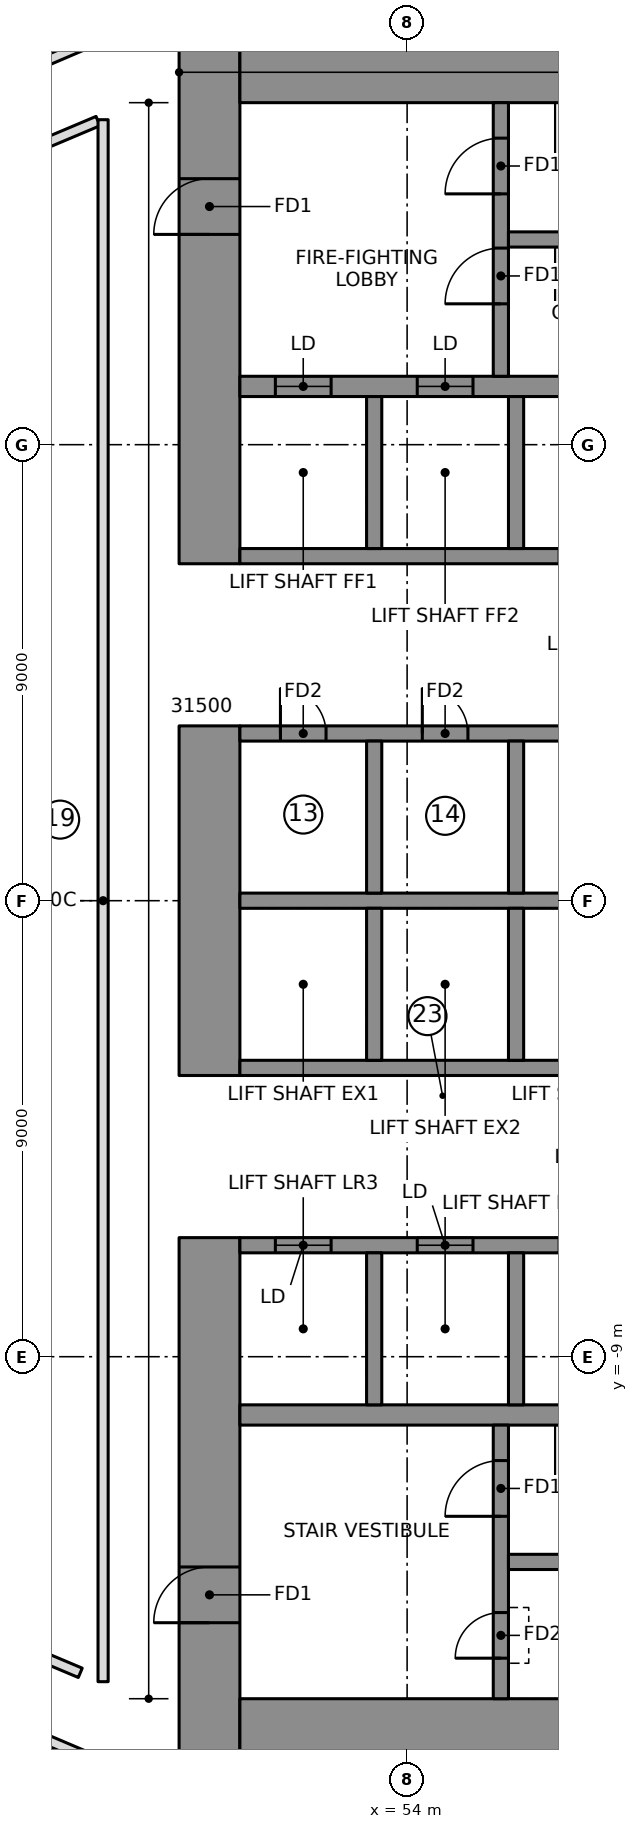
"""IFC4 building model, lengths in metres.
Left out: names, types, materials, properties, quantities, classifications, styles, units other than length and angle.
Written with IfcOpenShell. Run it as: python <this file> out.ifc"""

import sys

from ifc_helpers import new_model, si_unit, direction, frame, frame_2d, origin, place, context, subcontext, project, spatial, rectangle, extrude, element, fill, save


model = new_model("IFC4")
c1 = context("Model", 3, precision=1e-05, world=origin(), true_north=direction((0.0, 1.0)))
c2 = subcontext(c1, "Body", "Model", "MODEL_VIEW")
j1 = project(units=[si_unit("LENGTHUNIT", "METRE"), si_unit("PLANEANGLEUNIT", "RADIAN")], contexts=[c1])
p1 = place(None, origin())
s1 = spatial("IfcSite", under=j1, at=p1, CompositionType="ELEMENT")
p2 = place(p1, origin())
s2 = spatial("IfcBuilding", under=s1, at=p2, CompositionType="ELEMENT")
p3 = place(p2, frame((0.0, 0.0, 50.25)))
s3 = spatial("IfcBuildingStorey", under=s2, at=p3, CompositionType="ELEMENT", Elevation=50.25)
p4 = place(p3, frame((50.1, 6.65, 0.0), z_axis=(0.0, 0.0, 1.0), x_axis=(0.0, 1.0, 0.0)))
e1 = element("IfcWall", 1, at=p4, inside=s3, PredefinedType="SHEAR", context=c2, shape_type="SweptSolid", body=[
    extrude(rectangle(XDim=10.3, YDim=1.2, at=frame_2d((5.15, 0.0))), origin(), (0.0, 0.0, 1.0), 3.55),
])
p5 = place(p4, frame((6.5, 0.0, 0.0)))
e2 = element("IfcOpeningElement", 2, at=p5, cuts=e1, PredefinedType="OPENING", context=c2, shape_type="SweptSolid", body=[
    extrude(rectangle(XDim=1.1, YDim=2.1, at=frame_2d((0.55, 1.05))), frame((0.0, 0.61, 0.0), z_axis=(0.0, -1.0, 0.0), x_axis=(1.0, 0.0, 0.0)), (0.0, 0.0, 1.0), 1.22),
])
p6 = place(p3, frame((50.1, -3.45, 0.0), z_axis=(0.0, 0.0, 1.0), x_axis=(0.0, 1.0, 0.0)))
e3 = element("IfcWall", 3, at=p6, inside=s3, PredefinedType="SHEAR", context=c2, shape_type="SweptSolid", body=[
    extrude(rectangle(XDim=6.9, YDim=1.2, at=frame_2d((3.45, 0.0))), origin(), (0.0, 0.0, 1.0), 3.55),
])
p7 = place(p3, frame((50.1, -16.95, 0.0), z_axis=(0.0, 0.0, 1.0), x_axis=(0.0, 1.0, 0.0)))
e4 = element("IfcWall", 4, at=p7, inside=s3, PredefinedType="SHEAR", context=c2, shape_type="SweptSolid", body=[
    extrude(rectangle(XDim=10.3, YDim=1.2, at=frame_2d((5.15, 0.0))), origin(), (0.0, 0.0, 1.0), 3.55),
])
p8 = place(p7, frame((2.7, 0.0, 0.0)))
e5 = element("IfcOpeningElement", 5, at=p8, cuts=e4, PredefinedType="OPENING", context=c2, shape_type="SweptSolid", body=[
    extrude(rectangle(XDim=1.1, YDim=2.1, at=frame_2d((0.55, 1.05))), frame((0.0, 0.61, 0.0), z_axis=(0.0, -1.0, 0.0), x_axis=(1.0, 0.0, 0.0)), (0.0, 0.0, 1.0), 1.22),
])
for number, where, z_axis, x_axis in (
    (6, (50.7, 16.35, 0.0), (0.0, 0.0, 1.0), (1.0, 0.0, 0.0)),
    (7, (50.7, -16.35, 0.0), (0.0, 0.0, 1.0), (1.0, 0.0, 0.0)),
):
    element("IfcWall", number, at=place(p3, frame(where, z_axis=z_axis, x_axis=x_axis)), inside=s3, PredefinedType="SHEAR", context=c2, shape_type="SweptSolid", body=[
        extrude(rectangle(XDim=14.22, YDim=1.2, at=frame_2d((7.11, 0.0))), origin(), (0.0, 0.0, 1.0), 3.55),
    ])
p9 = place(p3, frame((50.7, 10.15, 0.0), z_axis=(0.0, 0.0, 1.0), x_axis=(1.0, 0.0, 0.0)))
e8 = element("IfcWall", 8, at=p9, inside=s3, PredefinedType="SHEAR", context=c2, shape_type="SweptSolid", body=[
    extrude(rectangle(XDim=13.02, YDim=0.4, at=frame_2d((6.51, 0.0))), origin(), (0.0, 0.0, 1.0), 3.55),
])
p10 = place(p9, frame((0.7, 0.0, 0.0)))
e9 = element("IfcOpeningElement", 9, at=p10, cuts=e8, PredefinedType="OPENING", context=c2, shape_type="SweptSolid", body=[
    extrude(rectangle(XDim=1.1, YDim=2.1, at=frame_2d((0.55, 1.05))), frame((0.0, 0.21, 0.0), z_axis=(0.0, -1.0, 0.0), x_axis=(1.0, 0.0, 0.0)), (0.0, 0.0, 1.0), 0.42),
])
p11 = place(p9, frame((3.5, 0.0, 0.0)))
e10 = element("IfcOpeningElement", 10, at=p11, cuts=e8, PredefinedType="OPENING", context=c2, shape_type="SweptSolid", body=[
    extrude(rectangle(XDim=1.1, YDim=2.1, at=frame_2d((0.55, 1.05))), frame((0.0, 0.21, 0.0), z_axis=(0.0, -1.0, 0.0), x_axis=(1.0, 0.0, 0.0)), (0.0, 0.0, 1.0), 0.42),
])
p12 = place(p3, frame((50.7, -10.15, 0.0), z_axis=(0.0, 0.0, 1.0), x_axis=(1.0, 0.0, 0.0)))
e11 = element("IfcWall", 11, at=p12, inside=s3, PredefinedType="SHEAR", context=c2, shape_type="SweptSolid", body=[
    extrude(rectangle(XDim=13.02, YDim=0.4, at=frame_2d((6.51, 0.0))), origin(), (0.0, 0.0, 1.0), 3.55),
])
p13 = place(p3, frame((50.7, 0.0, 0.0), z_axis=(0.0, 0.0, 1.0), x_axis=(1.0, 0.0, 0.0)))
e12 = element("IfcWall", 12, at=p13, inside=s3, PredefinedType="SHEAR", context=c2, shape_type="SweptSolid", body=[
    extrude(rectangle(XDim=10.9, YDim=0.3, at=frame_2d((5.45, 0.0))), origin(), (0.0, 0.0, 1.0), 3.55),
])
p14 = place(p3, frame((50.7, 3.3, 0.0), z_axis=(0.0, 0.0, 1.0), x_axis=(1.0, 0.0, 0.0)))
e13 = element("IfcWall", 13, at=p14, inside=s3, PredefinedType="SHEAR", context=c2, shape_type="SweptSolid", body=[
    extrude(rectangle(XDim=10.9, YDim=0.3, at=frame_2d((5.45, 0.0))), origin(), (0.0, 0.0, 1.0), 3.55),
])
p15 = place(p14, frame((0.8, 0.0, 0.0)))
e14 = element("IfcOpeningElement", 14, at=p15, cuts=e13, PredefinedType="OPENING", context=c2, shape_type="SweptSolid", body=[
    extrude(rectangle(XDim=0.9, YDim=2.1, at=frame_2d((0.45, 1.05))), frame((0.0, 0.16, 0.0), z_axis=(0.0, -1.0, 0.0), x_axis=(1.0, 0.0, 0.0)), (0.0, 0.0, 1.0), 0.32),
])
p16 = place(p14, frame((3.6, 0.0, 0.0)))
e15 = element("IfcOpeningElement", 15, at=p16, cuts=e13, PredefinedType="OPENING", context=c2, shape_type="SweptSolid", body=[
    extrude(rectangle(XDim=0.9, YDim=2.1, at=frame_2d((0.45, 1.05))), frame((0.0, 0.16, 0.0), z_axis=(0.0, -1.0, 0.0), x_axis=(1.0, 0.0, 0.0)), (0.0, 0.0, 1.0), 0.32),
])
p17 = place(p14, frame((6.4, 0.0, 0.0)))
e16 = element("IfcOpeningElement", 16, at=p17, cuts=e13, PredefinedType="OPENING", context=c2, shape_type="SweptSolid", body=[
    extrude(rectangle(XDim=0.9, YDim=2.1, at=frame_2d((0.45, 1.05))), frame((0.0, 0.16, 0.0), z_axis=(0.0, -1.0, 0.0), x_axis=(1.0, 0.0, 0.0)), (0.0, 0.0, 1.0), 0.32),
])
p18 = place(p14, frame((9.2, 0.0, 0.0)))
e17 = element("IfcOpeningElement", 17, at=p18, cuts=e13, PredefinedType="OPENING", context=c2, shape_type="SweptSolid", body=[
    extrude(rectangle(XDim=0.9, YDim=2.1, at=frame_2d((0.45, 1.05))), frame((0.0, 0.16, 0.0), z_axis=(0.0, -1.0, 0.0), x_axis=(1.0, 0.0, 0.0)), (0.0, 0.0, 1.0), 0.32),
])
p19 = place(p3, frame((50.7, 6.8, 0.0), z_axis=(0.0, 0.0, 1.0), x_axis=(1.0, 0.0, 0.0)))
e18 = element("IfcWall", 18, at=p19, inside=s3, PredefinedType="SHEAR", context=c2, shape_type="SweptSolid", body=[
    extrude(rectangle(XDim=10.9, YDim=0.3, at=frame_2d((5.45, 0.0))), origin(), (0.0, 0.0, 1.0), 3.55),
])
p20 = place(p19, frame((6.3, 0.0, 0.0)))
e19 = element("IfcOpeningElement", 19, at=p20, cuts=e18, PredefinedType="OPENING", context=c2, shape_type="SweptSolid", body=[
    extrude(rectangle(XDim=1.1, YDim=2.1, at=frame_2d((0.55, 1.05))), frame((0.0, 0.16, 0.0), z_axis=(0.0, -1.0, 0.0), x_axis=(1.0, 0.0, 0.0)), (0.0, 0.0, 1.0), 0.32),
])
p21 = place(p19, frame((9.1, 0.0, 0.0)))
e20 = element("IfcOpeningElement", 20, at=p21, cuts=e18, PredefinedType="OPENING", context=c2, shape_type="SweptSolid", body=[
    extrude(rectangle(XDim=1.1, YDim=2.1, at=frame_2d((0.55, 1.05))), frame((0.0, 0.16, 0.0), z_axis=(0.0, -1.0, 0.0), x_axis=(1.0, 0.0, 0.0)), (0.0, 0.0, 1.0), 0.32),
])
for number, where, z_axis, x_axis in (
    (21, (53.35, 0.15, 0.0), (0.0, 0.0, 1.0), (0.0, 1.0, 0.0)),
    (22, (53.35, 6.95, 0.0), (0.0, 0.0, 1.0), (0.0, 1.0, 0.0)),
    (23, (56.15, 0.15, 0.0), (0.0, 0.0, 1.0), (0.0, 1.0, 0.0)),
    (24, (56.15, 6.95, 0.0), (0.0, 0.0, 1.0), (0.0, 1.0, 0.0)),
):
    element("IfcWall", number, at=place(p3, frame(where, z_axis=z_axis, x_axis=x_axis)), inside=s3, PredefinedType="SHEAR", context=c2, shape_type="SweptSolid", body=[
        extrude(rectangle(XDim=3.0, YDim=0.3, at=frame_2d((1.5, 0.0))), origin(), (0.0, 0.0, 1.0), 3.55),
    ])
p22 = place(p3, frame((50.7, -3.3, 0.0), z_axis=(0.0, 0.0, 1.0), x_axis=(1.0, 0.0, 0.0)))
e25 = element("IfcWall", 25, at=p22, inside=s3, PredefinedType="SHEAR", context=c2, shape_type="SweptSolid", body=[
    extrude(rectangle(XDim=10.9, YDim=0.3, at=frame_2d((5.45, 0.0))), origin(), (0.0, 0.0, 1.0), 3.55),
])
p23 = place(p22, frame((9.2, 0.0, 0.0)))
e26 = element("IfcOpeningElement", 26, at=p23, cuts=e25, PredefinedType="OPENING", context=c2, shape_type="SweptSolid", body=[
    extrude(rectangle(XDim=0.9, YDim=2.1, at=frame_2d((0.45, 1.05))), frame((0.0, 0.16, 0.0), z_axis=(0.0, -1.0, 0.0), x_axis=(1.0, 0.0, 0.0)), (0.0, 0.0, 1.0), 0.32),
])
p24 = place(p3, frame((50.7, -6.8, 0.0), z_axis=(0.0, 0.0, 1.0), x_axis=(1.0, 0.0, 0.0)))
e27 = element("IfcWall", 27, at=p24, inside=s3, PredefinedType="SHEAR", context=c2, shape_type="SweptSolid", body=[
    extrude(rectangle(XDim=10.9, YDim=0.3, at=frame_2d((5.45, 0.0))), origin(), (0.0, 0.0, 1.0), 3.55),
])
p25 = place(p24, frame((0.7, 0.0, 0.0)))
e28 = element("IfcOpeningElement", 28, at=p25, cuts=e27, PredefinedType="OPENING", context=c2, shape_type="SweptSolid", body=[
    extrude(rectangle(XDim=1.1, YDim=2.1, at=frame_2d((0.55, 1.05))), frame((0.0, 0.16, 0.0), z_axis=(0.0, -1.0, 0.0), x_axis=(1.0, 0.0, 0.0)), (0.0, 0.0, 1.0), 0.32),
])
p26 = place(p24, frame((3.5, 0.0, 0.0)))
e29 = element("IfcOpeningElement", 29, at=p26, cuts=e27, PredefinedType="OPENING", context=c2, shape_type="SweptSolid", body=[
    extrude(rectangle(XDim=1.1, YDim=2.1, at=frame_2d((0.55, 1.05))), frame((0.0, 0.16, 0.0), z_axis=(0.0, -1.0, 0.0), x_axis=(1.0, 0.0, 0.0)), (0.0, 0.0, 1.0), 0.32),
])
p27 = place(p24, frame((6.3, 0.0, 0.0)))
e30 = element("IfcOpeningElement", 30, at=p27, cuts=e27, PredefinedType="OPENING", context=c2, shape_type="SweptSolid", body=[
    extrude(rectangle(XDim=1.1, YDim=2.1, at=frame_2d((0.55, 1.05))), frame((0.0, 0.16, 0.0), z_axis=(0.0, -1.0, 0.0), x_axis=(1.0, 0.0, 0.0)), (0.0, 0.0, 1.0), 0.32),
])
p28 = place(p24, frame((9.1, 0.0, 0.0)))
e31 = element("IfcOpeningElement", 31, at=p28, cuts=e27, PredefinedType="OPENING", context=c2, shape_type="SweptSolid", body=[
    extrude(rectangle(XDim=1.1, YDim=2.1, at=frame_2d((0.55, 1.05))), frame((0.0, 0.16, 0.0), z_axis=(0.0, -1.0, 0.0), x_axis=(1.0, 0.0, 0.0)), (0.0, 0.0, 1.0), 0.32),
])
for number, where, z_axis, x_axis in (
    (32, (53.35, -3.15, 0.0), (0.0, 0.0, 1.0), (0.0, 1.0, 0.0)),
    (33, (53.35, -9.95, 0.0), (0.0, 0.0, 1.0), (0.0, 1.0, 0.0)),
    (34, (56.15, -3.15, 0.0), (0.0, 0.0, 1.0), (0.0, 1.0, 0.0)),
    (35, (56.15, -9.95, 0.0), (0.0, 0.0, 1.0), (0.0, 1.0, 0.0)),
):
    element("IfcWall", number, at=place(p3, frame(where, z_axis=z_axis, x_axis=x_axis)), inside=s3, PredefinedType="SHEAR", context=c2, shape_type="SweptSolid", body=[
        extrude(rectangle(XDim=3.0, YDim=0.3, at=frame_2d((1.5, 0.0))), origin(), (0.0, 0.0, 1.0), 3.55),
    ])
p29 = place(p3, frame((55.85, 10.35, 0.0), z_axis=(0.0, 0.0, 1.0), x_axis=(0.0, 1.0, 0.0)))
e36 = element("IfcWall", 36, at=p29, inside=s3, PredefinedType="SHEAR", context=c2, shape_type="SweptSolid", body=[
    extrude(rectangle(XDim=5.4, YDim=0.3, at=frame_2d((2.7, 0.0))), origin(), (0.0, 0.0, 1.0), 3.55),
])
p30 = place(p29, frame((1.43, 0.0, 0.0)))
e37 = element("IfcOpeningElement", 37, at=p30, cuts=e36, PredefinedType="OPENING", context=c2, shape_type="SweptSolid", body=[
    extrude(rectangle(XDim=1.1, YDim=2.1, at=frame_2d((0.55, 1.05))), frame((0.0, 0.16, 0.0), z_axis=(0.0, -1.0, 0.0), x_axis=(1.0, 0.0, 0.0)), (0.0, 0.0, 1.0), 0.32),
])
p31 = place(p29, frame((3.6, 0.0, 0.0)))
e38 = element("IfcOpeningElement", 38, at=p31, cuts=e36, PredefinedType="OPENING", context=c2, shape_type="SweptSolid", body=[
    extrude(rectangle(XDim=1.1, YDim=2.1, at=frame_2d((0.55, 1.05))), frame((0.0, 0.16, 0.0), z_axis=(0.0, -1.0, 0.0), x_axis=(1.0, 0.0, 0.0)), (0.0, 0.0, 1.0), 0.32),
])
p32 = place(p3, frame((55.85, -15.75, 0.0), z_axis=(0.0, 0.0, 1.0), x_axis=(0.0, 1.0, 0.0)))
e39 = element("IfcWall", 39, at=p32, inside=s3, PredefinedType="SHEAR", context=c2, shape_type="SweptSolid", body=[
    extrude(rectangle(XDim=5.4, YDim=0.3, at=frame_2d((2.7, 0.0))), origin(), (0.0, 0.0, 1.0), 3.55),
])
p33 = place(p32, frame((3.6, 0.0, 0.0)))
e40 = element("IfcOpeningElement", 40, at=p33, cuts=e39, PredefinedType="OPENING", context=c2, shape_type="SweptSolid", body=[
    extrude(rectangle(XDim=1.1, YDim=2.1, at=frame_2d((0.55, 1.05))), frame((0.0, 0.16, 0.0), z_axis=(0.0, -1.0, 0.0), x_axis=(1.0, 0.0, 0.0)), (0.0, 0.0, 1.0), 0.32),
])
p34 = place(p32, frame((0.8, 0.0, 0.0)))
e41 = element("IfcOpeningElement", 41, at=p34, cuts=e39, PredefinedType="OPENING", context=c2, shape_type="SweptSolid", body=[
    extrude(rectangle(XDim=0.9, YDim=2.1, at=frame_2d((0.45, 1.05))), frame((0.0, 0.16, 0.0), z_axis=(0.0, -1.0, 0.0), x_axis=(1.0, 0.0, 0.0)), (0.0, 0.0, 1.0), 0.32),
])
for number, where, z_axis, x_axis in (
    (42, (56.0, 13.05, 0.0), (0.0, 0.0, 1.0), (1.0, 0.0, 0.0)),
    (43, (56.0, -13.05, 0.0), (0.0, 0.0, 1.0), (1.0, 0.0, 0.0)),
):
    element("IfcWall", number, at=place(p3, frame(where, z_axis=z_axis, x_axis=x_axis)), inside=s3, PredefinedType="SHEAR", context=c2, shape_type="SweptSolid", body=[
        extrude(rectangle(XDim=7.72, YDim=0.3, at=frame_2d((3.86, 0.0))), origin(), (0.0, 0.0, 1.0), 3.55),
    ])
p35 = place(p3, frame((43.85, 13.677, 0.0), z_axis=(0.0, 0.0, 1.0), x_axis=(0.921265924084, 0.388933281068, 0.0)))
e44 = element("IfcWall", 44, at=p35, inside=s3, PredefinedType="PARTITIONING", context=c2, shape_type="SweptSolid", body=[
    extrude(rectangle(XDim=4.396, YDim=0.2, at=frame_2d((2.198, 0.0))), origin(), (0.0, 0.0, 1.0), 3.25),
])
p36 = place(p35, frame((1.508, 0.0, 0.0)))
e45 = element("IfcOpeningElement", 45, at=p36, cuts=e44, PredefinedType="OPENING", context=c2, shape_type="SweptSolid", body=[
    extrude(rectangle(XDim=1.0, YDim=2.1, at=frame_2d((0.5, 1.05))), frame((0.0, 0.11, 0.0), z_axis=(0.0, -1.0, 0.0), x_axis=(1.0, 0.0, 0.0)), (0.0, 0.0, 1.0), 0.22),
])
p37 = place(p3, frame((47.55, -15.239, 0.0), z_axis=(0.0, 0.0, 1.0), x_axis=(-0.921269894054, 0.388923877269, 0.0)))
e46 = element("IfcWall", 46, at=p37, inside=s3, PredefinedType="PARTITIONING", context=c2, shape_type="SweptSolid", body=[
    extrude(rectangle(XDim=4.016, YDim=0.2, at=frame_2d((2.008, 0.0))), origin(), (0.0, 0.0, 1.0), 3.25),
])
p38 = place(p3, frame((47.704, 16.931, 0.0), z_axis=(0.0, 0.0, 1.0), x_axis=(-0.919360612497, -0.39341589214, 0.0)))
e47 = element("IfcWall", 47, at=p38, inside=s3, PredefinedType="PARTITIONING", context=c2, shape_type="SweptSolid", body=[
    extrude(rectangle(XDim=8.137, YDim=0.2, at=frame_2d((4.068, 0.0))), origin(), (0.0, 0.0, 1.0), 3.25),
])
p39 = place(p38, frame((3.568, 0.0, 0.0)))
e48 = element("IfcOpeningElement", 48, at=p39, cuts=e47, PredefinedType="OPENING", context=c2, shape_type="SweptSolid", body=[
    extrude(rectangle(XDim=1.0, YDim=2.1, at=frame_2d((0.5, 1.05))), frame((0.0, 0.11, 0.0), z_axis=(0.0, -1.0, 0.0), x_axis=(1.0, 0.0, 0.0)), (0.0, 0.0, 1.0), 0.22),
])
p40 = place(p3, frame((40.223, -13.73, 0.0), z_axis=(0.0, 0.0, 1.0), x_axis=(0.920292261621, -0.391231585127, 0.0)))
e49 = element("IfcWall", 49, at=p40, inside=s3, PredefinedType="PARTITIONING", context=c2, shape_type="SweptSolid", body=[
    extrude(rectangle(XDim=8.129, YDim=0.2, at=frame_2d((4.064, 0.0))), origin(), (0.0, 0.0, 1.0), 3.25),
])
p41 = place(p40, frame((3.05, 0.0, 0.0)))
e50 = element("IfcOpeningElement", 50, at=p41, cuts=e49, PredefinedType="OPENING", context=c2, shape_type="SweptSolid", body=[
    extrude(rectangle(XDim=1.0, YDim=2.1, at=frame_2d((0.5, 1.05))), frame((0.0, 0.11, 0.0), z_axis=(0.0, -1.0, 0.0), x_axis=(1.0, 0.0, 0.0)), (0.0, 0.0, 1.0), 0.22),
])
p42 = place(p3, frame((48.0, 15.414, 0.0), z_axis=(0.0, 0.0, 1.0), x_axis=(0.0, -1.0, 0.0)))
e51 = element("IfcWall", 51, at=p42, inside=s3, PredefinedType="PARTITIONING", context=c2, shape_type="SweptSolid", body=[
    extrude(rectangle(XDim=30.828, YDim=0.2, at=frame_2d((15.414, 0.0))), origin(), (0.0, 0.0, 1.0), 3.25),
])
p43 = place(p10, origin())
e52 = element("IfcDoor", 52, at=p43, inside=s3, OperationType="DOUBLE_DOOR_SLIDING", PredefinedType="DOOR", context=c2, shape_type="SweptSolid", body=[
    extrude(rectangle(XDim=1.1, YDim=2.1, at=frame_2d((0.55, 1.05))), frame((0.0, 0.025, 0.0), z_axis=(0.0, -1.0, 0.0), x_axis=(1.0, 0.0, 0.0)), (0.0, 0.0, 1.0), 0.05),
])
fill(e9, e52)
p44 = place(p11, origin())
e53 = element("IfcDoor", 53, at=p44, inside=s3, OperationType="DOUBLE_DOOR_SLIDING", PredefinedType="DOOR", context=c2, shape_type="SweptSolid", body=[
    extrude(rectangle(XDim=1.1, YDim=2.1, at=frame_2d((0.55, 1.05))), frame((0.0, 0.025, 0.0), z_axis=(0.0, -1.0, 0.0), x_axis=(1.0, 0.0, 0.0)), (0.0, 0.0, 1.0), 0.05),
])
fill(e10, e53)
p45 = place(p25, origin())
e54 = element("IfcDoor", 54, at=p45, inside=s3, OperationType="DOUBLE_DOOR_SLIDING", PredefinedType="DOOR", context=c2, shape_type="SweptSolid", body=[
    extrude(rectangle(XDim=1.1, YDim=2.1, at=frame_2d((0.55, 1.05))), frame((0.0, 0.025, 0.0), z_axis=(0.0, -1.0, 0.0), x_axis=(1.0, 0.0, 0.0)), (0.0, 0.0, 1.0), 0.05),
])
fill(e28, e54)
p46 = place(p26, origin())
e55 = element("IfcDoor", 55, at=p46, inside=s3, OperationType="DOUBLE_DOOR_SLIDING", PredefinedType="DOOR", context=c2, shape_type="SweptSolid", body=[
    extrude(rectangle(XDim=1.1, YDim=2.1, at=frame_2d((0.55, 1.05))), frame((0.0, 0.025, 0.0), z_axis=(0.0, -1.0, 0.0), x_axis=(1.0, 0.0, 0.0)), (0.0, 0.0, 1.0), 0.05),
])
fill(e29, e55)
p47 = place(p30, origin())
e56 = element("IfcDoor", 56, at=p47, inside=s3, OperationType="SINGLE_SWING_RIGHT", PredefinedType="DOOR", context=c2, shape_type="SweptSolid", body=[
    extrude(rectangle(XDim=1.1, YDim=2.1, at=frame_2d((0.55, 1.05))), frame((0.0, 0.025, 0.0), z_axis=(0.0, -1.0, 0.0), x_axis=(1.0, 0.0, 0.0)), (0.0, 0.0, 1.0), 0.05),
])
fill(e37, e56)
p48 = place(p31, origin())
e57 = element("IfcDoor", 57, at=p48, inside=s3, OperationType="SINGLE_SWING_RIGHT", PredefinedType="DOOR", context=c2, shape_type="SweptSolid", body=[
    extrude(rectangle(XDim=1.1, YDim=2.1, at=frame_2d((0.55, 1.05))), frame((0.0, 0.025, 0.0), z_axis=(0.0, -1.0, 0.0), x_axis=(1.0, 0.0, 0.0)), (0.0, 0.0, 1.0), 0.05),
])
fill(e38, e57)
p49 = place(p33, origin())
e58 = element("IfcDoor", 58, at=p49, inside=s3, OperationType="SINGLE_SWING_RIGHT", PredefinedType="DOOR", context=c2, shape_type="SweptSolid", body=[
    extrude(rectangle(XDim=1.1, YDim=2.1, at=frame_2d((0.55, 1.05))), frame((0.0, 0.025, 0.0), z_axis=(0.0, -1.0, 0.0), x_axis=(1.0, 0.0, 0.0)), (0.0, 0.0, 1.0), 0.05),
])
fill(e40, e58)
p50 = place(p5, origin())
e59 = element("IfcDoor", 59, at=p50, inside=s3, OperationType="SINGLE_SWING_RIGHT", PredefinedType="DOOR", context=c2, shape_type="SweptSolid", body=[
    extrude(rectangle(XDim=1.1, YDim=2.1, at=frame_2d((0.55, 1.05))), frame((0.0, 0.025, 0.0), z_axis=(0.0, -1.0, 0.0), x_axis=(1.0, 0.0, 0.0)), (0.0, 0.0, 1.0), 0.05),
])
fill(e2, e59)
p51 = place(p8, origin())
e60 = element("IfcDoor", 60, at=p51, inside=s3, OperationType="SINGLE_SWING_RIGHT", PredefinedType="DOOR", context=c2, shape_type="SweptSolid", body=[
    extrude(rectangle(XDim=1.1, YDim=2.1, at=frame_2d((0.55, 1.05))), frame((0.0, 0.025, 0.0), z_axis=(0.0, -1.0, 0.0), x_axis=(1.0, 0.0, 0.0)), (0.0, 0.0, 1.0), 0.05),
])
fill(e5, e60)
p52 = place(p34, origin())
e61 = element("IfcDoor", 61, at=p52, inside=s3, OperationType="SINGLE_SWING_LEFT", PredefinedType="DOOR", context=c2, shape_type="SweptSolid", body=[
    extrude(rectangle(XDim=0.9, YDim=2.1, at=frame_2d((0.45, 1.05))), frame((0.0, 0.025, 0.0), z_axis=(0.0, -1.0, 0.0), x_axis=(1.0, 0.0, 0.0)), (0.0, 0.0, 1.0), 0.05),
])
fill(e41, e61)
p53 = place(p15, origin())
e62 = element("IfcDoor", 62, at=p53, inside=s3, OperationType="SINGLE_SWING_LEFT", PredefinedType="DOOR", context=c2, shape_type="SweptSolid", body=[
    extrude(rectangle(XDim=0.9, YDim=2.1, at=frame_2d((0.45, 1.05))), frame((0.0, 0.025, 0.0), z_axis=(0.0, -1.0, 0.0), x_axis=(1.0, 0.0, 0.0)), (0.0, 0.0, 1.0), 0.05),
])
fill(e14, e62)
p54 = place(p16, origin())
e63 = element("IfcDoor", 63, at=p54, inside=s3, OperationType="SINGLE_SWING_LEFT", PredefinedType="DOOR", context=c2, shape_type="SweptSolid", body=[
    extrude(rectangle(XDim=0.9, YDim=2.1, at=frame_2d((0.45, 1.05))), frame((0.0, 0.025, 0.0), z_axis=(0.0, -1.0, 0.0), x_axis=(1.0, 0.0, 0.0)), (0.0, 0.0, 1.0), 0.05),
])
fill(e15, e63)
save(model, sys.argv[1])
